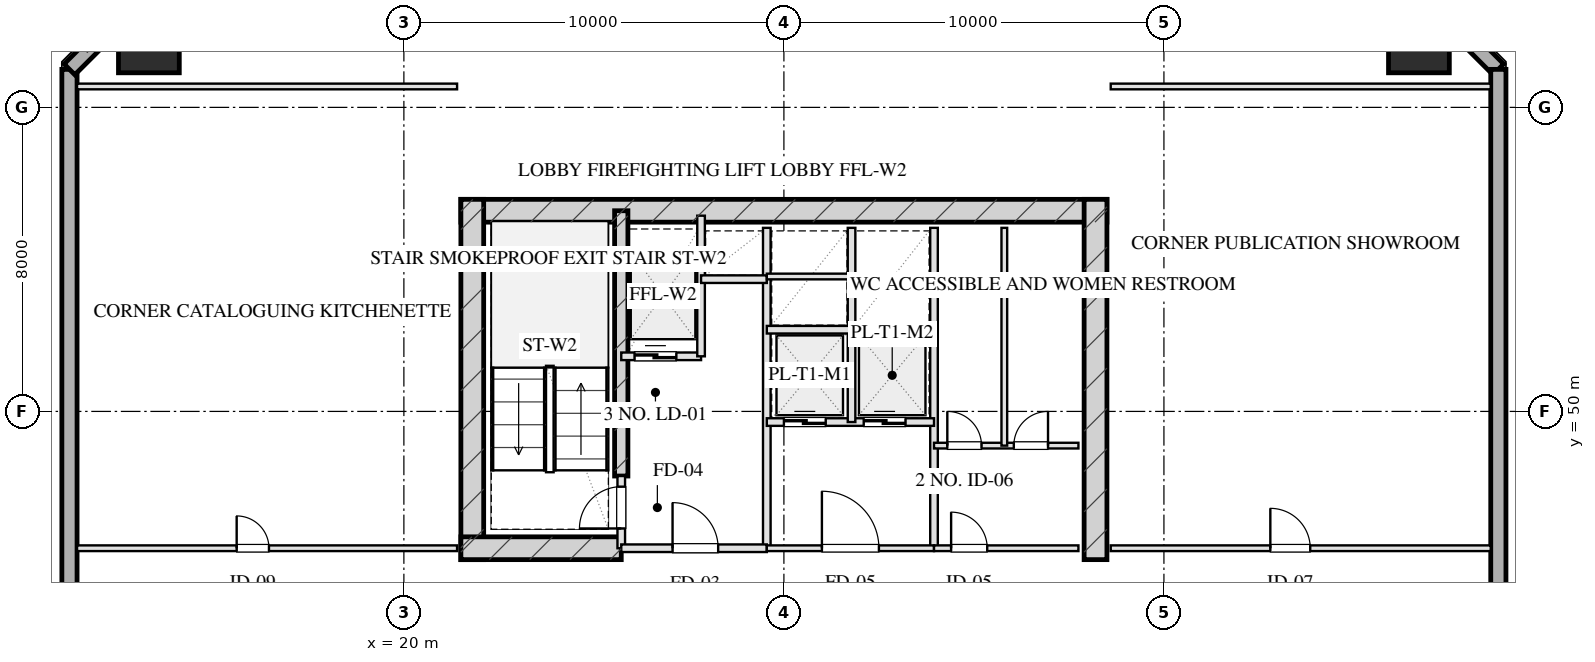
"""IFC4 building model, lengths in metres.
Left out: names, types, materials, properties, quantities, classifications, styles, units other than length and angle.
Written with IfcOpenShell. Run it as: python <this file> out.ifc"""

import sys

from ifc_helpers import new_model, si_unit, direction, frame, frame_2d, origin, origin_2d, place, context, subcontext, project, spatial, rectangle, hollow_rectangle, extrude, element, fill, save


model = new_model("IFC4")
c1 = context("Model", 3, precision=1e-05, world=origin(), true_north=direction((0.0, 1.0)))
c2 = subcontext(c1, "Body", "Model", "MODEL_VIEW")
j1 = project(units=[si_unit("LENGTHUNIT", "METRE"), si_unit("PLANEANGLEUNIT", "RADIAN")], contexts=[c1])
p1 = place(None, origin())
s1 = spatial("IfcSite", under=j1, at=p1, CompositionType="ELEMENT")
p2 = place(p1, origin())
s2 = spatial("IfcBuilding", under=s1, at=p2, CompositionType="ELEMENT")
p3 = place(p2, frame((0.0, 0.0, 120.75)))
s3 = spatial("IfcBuildingStorey", under=s2, at=p3, CompositionType="ELEMENT", Elevation=120.75)
p4 = place(p3, frame((21.5, 55.28, 0.0), z_axis=(0.0, 0.0, 1.0), x_axis=(1.0, 0.0, 0.0)))
e1 = element("IfcWall", 1, at=p4, inside=s3, PredefinedType="SHEAR", context=c2, shape_type="SweptSolid", body=[
    extrude(rectangle(XDim=17.0, YDim=0.6, at=frame_2d((8.5, 0.0))), origin(), (0.0, 0.0, 1.0), 3.45),
])
for number, where, z_axis, x_axis in (
    (2, (21.8, 46.1, 0.0), (0.0, 0.0, 1.0), (0.0, 1.0, 0.0)),
    (3, (38.2, 46.1, 0.0), (0.0, 0.0, 1.0), (0.0, 1.0, 0.0)),
):
    element("IfcWall", number, at=place(p3, frame(where, z_axis=z_axis, x_axis=x_axis)), inside=s3, PredefinedType="SHEAR", context=c2, shape_type="SweptSolid", body=[
        extrude(rectangle(XDim=9.48, YDim=0.6, at=frame_2d((4.74, 0.0))), origin(), (0.0, 0.0, 1.0), 3.45),
    ])
p5 = place(p3, frame((25.72, 48.3, 0.0), z_axis=(0.0, 0.0, 1.0), x_axis=(0.0, 1.0, 0.0)))
e4 = element("IfcWall", 4, at=p5, inside=s3, PredefinedType="SHEAR", context=c2, shape_type="SweptSolid", body=[
    extrude(rectangle(XDim=6.98, YDim=0.35, at=frame_2d((3.49, 0.0))), origin(), (0.0, 0.0, 1.0), 3.45),
])
p6 = place(p3, frame((21.5, 46.4, 0.0), z_axis=(0.0, 0.0, 1.0), x_axis=(1.0, 0.0, 0.0)))
e5 = element("IfcWall", 5, at=p6, inside=s3, PredefinedType="SHEAR", context=c2, shape_type="SweptSolid", body=[
    extrude(rectangle(XDim=4.22, YDim=0.6, at=frame_2d((2.11, 0.0))), origin(), (0.0, 0.0, 1.0), 3.45),
])
for number, where, z_axis, x_axis in (
    (6, (46.71, 59.71, 0.0), (0.0, 0.0, 1.0), (1.0, 0.0, 0.0)),
    (7, (13.29, 59.71, 0.0), (0.0, 0.0, 1.0), (1.0, 0.0, 0.0)),
):
    element("IfcColumn", number, at=place(p3, frame(where, z_axis=z_axis, x_axis=x_axis)), inside=s3, PredefinedType="COLUMN", context=c2, shape_type="SweptSolid", body=[
        extrude(hollow_rectangle(XDim=1.6, YDim=1.6, WallThickness=0.055, at=origin_2d()), origin(), (0.0, 0.0, 1.0), 3.451),
    ])
p7 = place(p3, frame((11.2, 9.0, 0.0), z_axis=(0.0, 0.0, 1.0), x_axis=(0.0, 1.0, 0.0)))
e8 = element("IfcWall", 8, at=p7, inside=s3, PredefinedType="SOLIDWALL", context=c2, shape_type="SweptSolid", body=[
    extrude(rectangle(XDim=50.0, YDim=0.4, at=frame_2d((25.0, 0.0))), origin(), (0.0, 0.0, 1.0), 2.61),
])
p8 = place(p7, frame((17.4, 0.0, 0.75)))
e9 = element("IfcOpeningElement", 9, at=p8, cuts=e8, PredefinedType="OPENING", context=c2, shape_type="SweptSolid", body=[
    extrude(rectangle(XDim=2.4, YDim=1.46, at=frame_2d((1.2, 0.73))), frame((0.0, 0.21, 0.0), z_axis=(0.0, -1.0, 0.0), x_axis=(1.0, 0.0, 0.0)), (0.0, 0.0, 1.0), 0.42),
])
p9 = place(p7, frame((30.25, 0.0, 0.0)))
e10 = element("IfcOpeningElement", 10, at=p9, cuts=e8, PredefinedType="OPENING", context=c2, shape_type="SweptSolid", body=[
    extrude(rectangle(XDim=1.1, YDim=2.15, at=frame_2d((0.55, 1.075))), frame((0.0, 0.21, 0.0), z_axis=(0.0, -1.0, 0.0), x_axis=(1.0, 0.0, 0.0)), (0.0, 0.0, 1.0), 0.42),
])
for number, where, z_axis, x_axis in (
    (11, (11.2, 59.0, 0.0), (0.0, 0.0, 1.0), (0.707, 0.707, 0.0)),
    (12, (46.0, 61.8, 0.0), (0.0, 0.0, 1.0), (0.707, -0.707, 0.0)),
):
    element("IfcWall", number, at=place(p3, frame(where, z_axis=z_axis, x_axis=x_axis)), inside=s3, PredefinedType="SOLIDWALL", context=c2, shape_type="SweptSolid", body=[
        extrude(rectangle(XDim=3.96, YDim=0.4, at=frame_2d((1.98, 0.0))), origin(), (0.0, 0.0, 1.0), 2.61),
    ])
p10 = place(p3, frame((48.8, 59.0, 0.0), z_axis=(0.0, 0.0, 1.0), x_axis=(0.0, -1.0, 0.0)))
e13 = element("IfcWall", 13, at=p10, inside=s3, PredefinedType="SOLIDWALL", context=c2, shape_type="SweptSolid", body=[
    extrude(rectangle(XDim=50.0, YDim=0.4, at=frame_2d((25.0, 0.0))), origin(), (0.0, 0.0, 1.0), 2.61),
])
p11 = place(p10, frame((18.583, 0.0, 0.0)))
e14 = element("IfcOpeningElement", 14, at=p11, cuts=e13, PredefinedType="OPENING", context=c2, shape_type="SweptSolid", body=[
    extrude(rectangle(XDim=1.1, YDim=2.15, at=frame_2d((0.55, 1.075))), frame((0.0, 0.21, 0.0), z_axis=(0.0, -1.0, 0.0), x_axis=(1.0, 0.0, 0.0)), (0.0, 0.0, 1.0), 0.42),
])
p12 = place(p3, frame((25.72, 46.4, 0.0), z_axis=(0.0, 0.0, 1.0), x_axis=(0.0, 1.0, 0.0)))
e15 = element("IfcWall", 15, at=p12, inside=s3, PredefinedType="PARTITIONING", context=c2, shape_type="SweptSolid", body=[
    extrude(rectangle(XDim=1.9, YDim=0.2, at=frame_2d((0.95, 0.0))), origin(), (0.0, 0.0, 1.0), 3.175),
])
p13 = place(p12, frame((0.52, 0.0, 0.0)))
e16 = element("IfcOpeningElement", 16, at=p13, cuts=e15, PredefinedType="OPENING", context=c2, shape_type="SweptSolid", body=[
    extrude(rectangle(XDim=1.1, YDim=2.05, at=frame_2d((0.55, 1.025))), frame((0.0, 0.11, 0.0), z_axis=(0.0, -1.0, 0.0), x_axis=(1.0, 0.0, 0.0)), (0.0, 0.0, 1.0), 0.22),
])
p14 = place(p3, frame((29.55, 46.4, 0.0), z_axis=(0.0, 0.0, 1.0), x_axis=(0.0, 1.0, 0.0)))
e17 = element("IfcWall", 17, at=p14, inside=s3, PredefinedType="PARTITIONING", context=c2, shape_type="SweptSolid", body=[
    extrude(rectangle(XDim=8.43, YDim=0.2, at=frame_2d((4.215, 0.0))), origin(), (0.0, 0.0, 1.0), 3.175),
])
p15 = place(p3, frame((25.72, 46.4, 0.0), z_axis=(0.0, 0.0, 1.0), x_axis=(1.0, 0.0, 0.0)))
e18 = element("IfcWall", 18, at=p15, inside=s3, PredefinedType="PARTITIONING", context=c2, shape_type="SweptSolid", body=[
    extrude(rectangle(XDim=3.83, YDim=0.2, at=frame_2d((1.915, 0.0))), origin(), (0.0, 0.0, 1.0), 3.175),
])
p16 = place(p15, frame((1.35, 0.0, 0.0)))
e19 = element("IfcOpeningElement", 19, at=p16, cuts=e18, PredefinedType="OPENING", context=c2, shape_type="SweptSolid", body=[
    extrude(rectangle(XDim=1.2, YDim=2.05, at=frame_2d((0.6, 1.025))), frame((0.0, 0.11, 0.0), z_axis=(0.0, -1.0, 0.0), x_axis=(1.0, 0.0, 0.0)), (0.0, 0.0, 1.0), 0.22),
])
p17 = place(p3, frame((25.72, 51.45, 0.0), z_axis=(0.0, 0.0, 1.0), x_axis=(1.0, 0.0, 0.0)))
e20 = element("IfcWall", 20, at=p17, inside=s3, PredefinedType="PARTITIONING", context=c2, shape_type="SweptSolid", body=[
    extrude(rectangle(XDim=2.1, YDim=0.2, at=frame_2d((1.05, 0.0))), origin(), (0.0, 0.0, 1.0), 3.175),
])
p18 = place(p17, frame((0.35, 0.0, 0.0)))
e21 = element("IfcOpeningElement", 21, at=p18, cuts=e20, PredefinedType="OPENING", context=c2, shape_type="SweptSolid", body=[
    extrude(rectangle(XDim=1.1, YDim=2.05, at=frame_2d((0.55, 1.025))), frame((0.0, 0.11, 0.0), z_axis=(0.0, -1.0, 0.0), x_axis=(1.0, 0.0, 0.0)), (0.0, 0.0, 1.0), 0.22),
])
p19 = place(p3, frame((27.82, 51.45, 0.0), z_axis=(0.0, 0.0, 1.0), x_axis=(0.0, 1.0, 0.0)))
e22 = element("IfcWall", 22, at=p19, inside=s3, PredefinedType="PARTITIONING", context=c2, shape_type="SweptSolid", body=[
    extrude(rectangle(XDim=3.7, YDim=0.2, at=frame_2d((1.85, 0.0))), origin(), (0.0, 0.0, 1.0), 3.175),
])
p20 = place(p3, frame((27.82, 53.48, 0.0), z_axis=(0.0, 0.0, 1.0), x_axis=(1.0, 0.0, 0.0)))
e23 = element("IfcWall", 23, at=p20, inside=s3, PredefinedType="PARTITIONING", context=c2, shape_type="SweptSolid", body=[
    extrude(rectangle(XDim=1.73, YDim=0.2, at=frame_2d((0.865, 0.0))), origin(), (0.0, 0.0, 1.0), 3.175),
])
p21 = place(p3, frame((33.95, 46.4, 0.0), z_axis=(0.0, 0.0, 1.0), x_axis=(0.0, 1.0, 0.0)))
e24 = element("IfcWall", 24, at=p21, inside=s3, PredefinedType="PARTITIONING", context=c2, shape_type="SweptSolid", body=[
    extrude(rectangle(XDim=8.43, YDim=0.2, at=frame_2d((4.215, 0.0))), origin(), (0.0, 0.0, 1.0), 3.175),
])
p22 = place(p3, frame((29.55, 46.4, 0.0), z_axis=(0.0, 0.0, 1.0), x_axis=(1.0, 0.0, 0.0)))
e25 = element("IfcWall", 25, at=p22, inside=s3, PredefinedType="PARTITIONING", context=c2, shape_type="SweptSolid", body=[
    extrude(rectangle(XDim=4.4, YDim=0.15, at=frame_2d((2.2, 0.0))), origin(), (0.0, 0.0, 1.0), 3.175),
])
p23 = place(p22, frame((1.45, 0.0, 0.0)))
e26 = element("IfcOpeningElement", 26, at=p23, cuts=e25, PredefinedType="OPENING", context=c2, shape_type="SweptSolid", body=[
    extrude(rectangle(XDim=1.5, YDim=2.05, at=frame_2d((0.75, 1.025))), frame((0.0, 0.085, 0.0), z_axis=(0.0, -1.0, 0.0), x_axis=(1.0, 0.0, 0.0)), (0.0, 0.0, 1.0), 0.17),
])
p24 = place(p3, frame((29.55, 49.72, 0.0), z_axis=(0.0, 0.0, 1.0), x_axis=(1.0, 0.0, 0.0)))
e27 = element("IfcWall", 27, at=p24, inside=s3, PredefinedType="PARTITIONING", context=c2, shape_type="SweptSolid", body=[
    extrude(rectangle(XDim=4.4, YDim=0.2, at=frame_2d((2.2, 0.0))), origin(), (0.0, 0.0, 1.0), 3.175),
])
p25 = place(p24, frame((0.45, 0.0, 0.0)))
e28 = element("IfcOpeningElement", 28, at=p25, cuts=e27, PredefinedType="OPENING", context=c2, shape_type="SweptSolid", body=[
    extrude(rectangle(XDim=1.1, YDim=2.05, at=frame_2d((0.55, 1.025))), frame((0.0, 0.11, 0.0), z_axis=(0.0, -1.0, 0.0), x_axis=(1.0, 0.0, 0.0)), (0.0, 0.0, 1.0), 0.22),
])
p26 = place(p24, frame((2.55, 0.0, 0.0)))
e29 = element("IfcOpeningElement", 29, at=p26, cuts=e27, PredefinedType="OPENING", context=c2, shape_type="SweptSolid", body=[
    extrude(rectangle(XDim=1.1, YDim=2.05, at=frame_2d((0.55, 1.025))), frame((0.0, 0.11, 0.0), z_axis=(0.0, -1.0, 0.0), x_axis=(1.0, 0.0, 0.0)), (0.0, 0.0, 1.0), 0.22),
])
p27 = place(p3, frame((31.78, 49.72, 0.0), z_axis=(0.0, 0.0, 1.0), x_axis=(0.0, 1.0, 0.0)))
e30 = element("IfcWall", 30, at=p27, inside=s3, PredefinedType="PARTITIONING", context=c2, shape_type="SweptSolid", body=[
    extrude(rectangle(XDim=5.11, YDim=0.2, at=frame_2d((2.555, 0.0))), origin(), (0.0, 0.0, 1.0), 3.175),
])
p28 = place(p3, frame((29.55, 52.15, 0.0), z_axis=(0.0, 0.0, 1.0), x_axis=(1.0, 0.0, 0.0)))
e31 = element("IfcWall", 31, at=p28, inside=s3, PredefinedType="PARTITIONING", context=c2, shape_type="SweptSolid", body=[
    extrude(rectangle(XDim=4.4, YDim=0.2, at=frame_2d((2.2, 0.0))), origin(), (0.0, 0.0, 1.0), 3.175),
])
p29 = place(p3, frame((29.55, 53.55, 0.0), z_axis=(0.0, 0.0, 1.0), x_axis=(1.0, 0.0, 0.0)))
e32 = element("IfcWall", 32, at=p29, inside=s3, PredefinedType="PARTITIONING", context=c2, shape_type="SweptSolid", body=[
    extrude(rectangle(XDim=2.23, YDim=0.15, at=frame_2d((1.115, 0.0))), origin(), (0.0, 0.0, 1.0), 3.175),
])
p30 = place(p3, frame((33.95, 46.4, 0.0), z_axis=(0.0, 0.0, 1.0), x_axis=(1.0, 0.0, 0.0)))
e33 = element("IfcWall", 33, at=p30, inside=s3, PredefinedType="PARTITIONING", context=c2, shape_type="SweptSolid", body=[
    extrude(rectangle(XDim=3.8, YDim=0.15, at=frame_2d((1.9, 0.0))), origin(), (0.0, 0.0, 1.0), 3.175),
])
p31 = place(p30, frame((0.45, 0.0, 0.0)))
e34 = element("IfcOpeningElement", 34, at=p31, cuts=e33, PredefinedType="OPENING", context=c2, shape_type="SweptSolid", body=[
    extrude(rectangle(XDim=0.95, YDim=2.05, at=frame_2d((0.475, 1.025))), frame((0.0, 0.085, 0.0), z_axis=(0.0, -1.0, 0.0), x_axis=(1.0, 0.0, 0.0)), (0.0, 0.0, 1.0), 0.17),
])
p32 = place(p3, frame((33.95, 49.1, 0.0), z_axis=(0.0, 0.0, 1.0), x_axis=(1.0, 0.0, 0.0)))
e35 = element("IfcWall", 35, at=p32, inside=s3, PredefinedType="PARTITIONING", context=c2, shape_type="SweptSolid", body=[
    extrude(rectangle(XDim=3.8, YDim=0.15, at=frame_2d((1.9, 0.0))), origin(), (0.0, 0.0, 1.0), 3.175),
])
p33 = place(p32, frame((0.35, 0.0, 0.0)))
e36 = element("IfcOpeningElement", 36, at=p33, cuts=e35, PredefinedType="OPENING", context=c2, shape_type="SweptSolid", body=[
    extrude(rectangle(XDim=0.9, YDim=2.05, at=frame_2d((0.45, 1.025))), frame((0.0, 0.085, 0.0), z_axis=(0.0, -1.0, 0.0), x_axis=(1.0, 0.0, 0.0)), (0.0, 0.0, 1.0), 0.17),
])
p34 = place(p32, frame((2.1, 0.0, 0.0)))
e37 = element("IfcOpeningElement", 37, at=p34, cuts=e35, PredefinedType="OPENING", context=c2, shape_type="SweptSolid", body=[
    extrude(rectangle(XDim=0.9, YDim=2.05, at=frame_2d((0.45, 1.025))), frame((0.0, 0.085, 0.0), z_axis=(0.0, -1.0, 0.0), x_axis=(1.0, 0.0, 0.0)), (0.0, 0.0, 1.0), 0.17),
])
p35 = place(p3, frame((35.8, 49.1, 0.0), z_axis=(0.0, 0.0, 1.0), x_axis=(0.0, 1.0, 0.0)))
e38 = element("IfcWall", 38, at=p35, inside=s3, PredefinedType="PARTITIONING", context=c2, shape_type="SweptSolid", body=[
    extrude(rectangle(XDim=5.73, YDim=0.15, at=frame_2d((2.865, 0.0))), origin(), (0.0, 0.0, 1.0), 3.175),
])
p36 = place(p3, frame((11.4, 58.55, 0.0), z_axis=(0.0, 0.0, 1.0), x_axis=(1.0, 0.0, 0.0)))
e39 = element("IfcWall", 39, at=p36, inside=s3, PredefinedType="PARTITIONING", context=c2, shape_type="SweptSolid", body=[
    extrude(rectangle(XDim=10.0, YDim=0.15, at=frame_2d((5.0, 0.0))), origin(), (0.0, 0.0, 1.0), 3.175),
])
p37 = place(p3, frame((11.4, 46.4, 0.0), z_axis=(0.0, 0.0, 1.0), x_axis=(1.0, 0.0, 0.0)))
e40 = element("IfcWall", 40, at=p37, inside=s3, PredefinedType="PARTITIONING", context=c2, shape_type="SweptSolid", body=[
    extrude(rectangle(XDim=10.0, YDim=0.15, at=frame_2d((5.0, 0.0))), origin(), (0.0, 0.0, 1.0), 3.175),
])
p38 = place(p37, frame((4.2, 0.0, 0.0)))
e41 = element("IfcOpeningElement", 41, at=p38, cuts=e40, PredefinedType="OPENING", context=c2, shape_type="SweptSolid", body=[
    extrude(rectangle(XDim=0.85, YDim=2.05, at=frame_2d((0.425, 1.025))), frame((0.0, 0.085, 0.0), z_axis=(0.0, -1.0, 0.0), x_axis=(1.0, 0.0, 0.0)), (0.0, 0.0, 1.0), 0.17),
])
p39 = place(p3, frame((38.6, 58.55, 0.0), z_axis=(0.0, 0.0, 1.0), x_axis=(1.0, 0.0, 0.0)))
e42 = element("IfcWall", 42, at=p39, inside=s3, PredefinedType="PARTITIONING", context=c2, shape_type="SweptSolid", body=[
    extrude(rectangle(XDim=10.0, YDim=0.15, at=frame_2d((5.0, 0.0))), origin(), (0.0, 0.0, 1.0), 3.175),
])
p40 = place(p3, frame((38.6, 46.4, 0.0), z_axis=(0.0, 0.0, 1.0), x_axis=(1.0, 0.0, 0.0)))
e43 = element("IfcWall", 43, at=p40, inside=s3, PredefinedType="PARTITIONING", context=c2, shape_type="SweptSolid", body=[
    extrude(rectangle(XDim=10.0, YDim=0.15, at=frame_2d((5.0, 0.0))), origin(), (0.0, 0.0, 1.0), 3.175),
])
p41 = place(p40, frame((4.2, 0.0, 0.0)))
e44 = element("IfcOpeningElement", 44, at=p41, cuts=e43, PredefinedType="OPENING", context=c2, shape_type="SweptSolid", body=[
    extrude(rectangle(XDim=1.05, YDim=2.05, at=frame_2d((0.525, 1.025))), frame((0.0, 0.085, 0.0), z_axis=(0.0, -1.0, 0.0), x_axis=(1.0, 0.0, 0.0)), (0.0, 0.0, 1.0), 0.17),
])
p42 = place(p13, origin())
e45 = element("IfcDoor", 45, at=p42, inside=s3, OperationType="SINGLE_SWING_LEFT", PredefinedType="DOOR", context=c2, shape_type="SweptSolid", body=[
    extrude(rectangle(XDim=1.1, YDim=2.05, at=frame_2d((0.55, 1.025))), frame((0.0, 0.025, 0.0), z_axis=(0.0, -1.0, 0.0), x_axis=(1.0, 0.0, 0.0)), (0.0, 0.0, 1.0), 0.05),
])
fill(e16, e45)
p43 = place(p16, origin())
e46 = element("IfcDoor", 46, at=p43, inside=s3, OperationType="SINGLE_SWING_LEFT", PredefinedType="DOOR", context=c2, shape_type="SweptSolid", body=[
    extrude(rectangle(XDim=1.2, YDim=2.05, at=frame_2d((0.6, 1.025))), frame((0.0, 0.025, 0.0), z_axis=(0.0, -1.0, 0.0), x_axis=(1.0, 0.0, 0.0)), (0.0, 0.0, 1.0), 0.05),
])
fill(e19, e46)
p44 = place(p18, origin())
e47 = element("IfcDoor", 47, at=p44, inside=s3, OperationType="DOUBLE_DOOR_SLIDING", PredefinedType="DOOR", context=c2, shape_type="SweptSolid", body=[
    extrude(rectangle(XDim=1.1, YDim=2.05, at=frame_2d((0.55, 1.025))), frame((0.0, 0.025, 0.0), z_axis=(0.0, -1.0, 0.0), x_axis=(1.0, 0.0, 0.0)), (0.0, 0.0, 1.0), 0.05),
])
fill(e21, e47)
p45 = place(p23, origin())
e48 = element("IfcDoor", 48, at=p45, inside=s3, OperationType="SINGLE_SWING_LEFT", PredefinedType="DOOR", context=c2, shape_type="SweptSolid", body=[
    extrude(rectangle(XDim=1.5, YDim=2.05, at=frame_2d((0.75, 1.025))), frame((0.0, 0.025, 0.0), z_axis=(0.0, -1.0, 0.0), x_axis=(1.0, 0.0, 0.0)), (0.0, 0.0, 1.0), 0.05),
])
fill(e26, e48)
p46 = place(p25, origin())
e49 = element("IfcDoor", 49, at=p46, inside=s3, OperationType="DOUBLE_DOOR_SLIDING", PredefinedType="DOOR", context=c2, shape_type="SweptSolid", body=[
    extrude(rectangle(XDim=1.1, YDim=2.05, at=frame_2d((0.55, 1.025))), frame((0.0, 0.025, 0.0), z_axis=(0.0, -1.0, 0.0), x_axis=(1.0, 0.0, 0.0)), (0.0, 0.0, 1.0), 0.05),
])
fill(e28, e49)
p47 = place(p26, origin())
e50 = element("IfcDoor", 50, at=p47, inside=s3, OperationType="DOUBLE_DOOR_SLIDING", PredefinedType="DOOR", context=c2, shape_type="SweptSolid", body=[
    extrude(rectangle(XDim=1.1, YDim=2.05, at=frame_2d((0.55, 1.025))), frame((0.0, 0.025, 0.0), z_axis=(0.0, -1.0, 0.0), x_axis=(1.0, 0.0, 0.0)), (0.0, 0.0, 1.0), 0.05),
])
fill(e29, e50)
p48 = place(p31, origin())
e51 = element("IfcDoor", 51, at=p48, inside=s3, OperationType="SINGLE_SWING_LEFT", PredefinedType="DOOR", context=c2, shape_type="SweptSolid", body=[
    extrude(rectangle(XDim=0.95, YDim=2.05, at=frame_2d((0.475, 1.025))), frame((0.0, 0.025, 0.0), z_axis=(0.0, -1.0, 0.0), x_axis=(1.0, 0.0, 0.0)), (0.0, 0.0, 1.0), 0.05),
])
fill(e34, e51)
p49 = place(p33, origin())
e52 = element("IfcDoor", 52, at=p49, inside=s3, OperationType="SINGLE_SWING_LEFT", PredefinedType="DOOR", context=c2, shape_type="SweptSolid", body=[
    extrude(rectangle(XDim=0.9, YDim=2.05, at=frame_2d((0.45, 1.025))), frame((0.0, 0.025, 0.0), z_axis=(0.0, -1.0, 0.0), x_axis=(1.0, 0.0, 0.0)), (0.0, 0.0, 1.0), 0.05),
])
fill(e36, e52)
p50 = place(p34, origin())
e53 = element("IfcDoor", 53, at=p50, inside=s3, OperationType="SINGLE_SWING_RIGHT", PredefinedType="DOOR", context=c2, shape_type="SweptSolid", body=[
    extrude(rectangle(XDim=0.9, YDim=2.05, at=frame_2d((0.45, 1.025))), frame((0.0, 0.025, 0.0), z_axis=(0.0, -1.0, 0.0), x_axis=(1.0, 0.0, 0.0)), (0.0, 0.0, 1.0), 0.05),
])
fill(e37, e53)
p51 = place(p38, origin())
e54 = element("IfcDoor", 54, at=p51, inside=s3, OperationType="SINGLE_SWING_LEFT", PredefinedType="DOOR", context=c2, shape_type="SweptSolid", body=[
    extrude(rectangle(XDim=0.85, YDim=2.05, at=frame_2d((0.425, 1.025))), frame((0.0, 0.025, 0.0), z_axis=(0.0, -1.0, 0.0), x_axis=(1.0, 0.0, 0.0)), (0.0, 0.0, 1.0), 0.05),
])
fill(e41, e54)
p52 = place(p41, origin())
e55 = element("IfcDoor", 55, at=p52, inside=s3, OperationType="SINGLE_SWING_LEFT", PredefinedType="DOOR", context=c2, shape_type="SweptSolid", body=[
    extrude(rectangle(XDim=1.05, YDim=2.05, at=frame_2d((0.525, 1.025))), frame((0.0, 0.025, 0.0), z_axis=(0.0, -1.0, 0.0), x_axis=(1.0, 0.0, 0.0)), (0.0, 0.0, 1.0), 0.05),
])
fill(e44, e55)
save(model, sys.argv[1])
